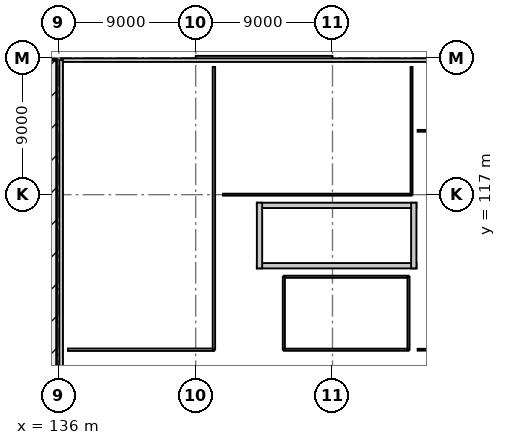
"""IFC4 building model, lengths in metres.
Left out: names, types, materials, properties, quantities, classifications, styles, units other than length and angle.
Written with IfcOpenShell. Run it as: python <this file> out.ifc"""

import sys

from ifc_helpers import new_model, si_unit, direction, frame, frame_2d, origin, origin_2d, place, context, subcontext, project, spatial, rectangle, i_section, extrude, element, fill, save


model = new_model("IFC4")
c1 = context("Model", 3, precision=1e-05, world=origin(), true_north=direction((0.0, 1.0)))
c2 = subcontext(c1, "Body", "Model", "MODEL_VIEW")
j1 = project(units=[si_unit("LENGTHUNIT", "METRE"), si_unit("PLANEANGLEUNIT", "RADIAN")], contexts=[c1])
p1 = place(None, origin())
s1 = spatial("IfcSite", under=j1, at=p1, CompositionType="ELEMENT")
p2 = place(p1, origin())
s2 = spatial("IfcBuilding", under=s1, at=p2, CompositionType="ELEMENT")
p3 = place(p2, frame((0.0, 0.0, 20.8)))
s3 = spatial("IfcBuildingStorey", under=s2, at=p3, CompositionType="ELEMENT", Elevation=20.8)
for number, where, z_axis, x_axis in (
    (1, (136.0, 117.0, 0.0), (0.0, 0.0, 1.0), (1.0, 0.0, 0.0)),
    (2, (136.0, 126.0, 0.0), (0.0, 0.0, 1.0), (1.0, 0.0, 0.0)),
    (3, (145.0, 117.0, 0.0), (0.0, 0.0, 1.0), (1.0, 0.0, 0.0)),
    (4, (145.0, 126.0, 0.0), (0.0, 0.0, 1.0), (1.0, 0.0, 0.0)),
    (5, (154.0, 117.0, 0.0), (0.0, 0.0, 1.0), (1.0, 0.0, 0.0)),
    (6, (154.0, 126.0, 0.0), (0.0, 0.0, 1.0), (1.0, 0.0, 0.0)),
):
    element("IfcColumn", number, at=place(p3, frame(where, z_axis=z_axis, x_axis=x_axis)), inside=s3, PredefinedType="COLUMN", context=c2, shape_type="SweptSolid", body=[
        extrude(i_section(OverallWidth=0.3, OverallDepth=0.3, WebThickness=0.01, FlangeThickness=0.015, FilletRadius=0.018, at=origin_2d()), origin(), (0.0, 0.0, 1.0), 2.85),
    ])
p4 = place(p3, frame((145.005, 126.0, 0.0), z_axis=(0.0, 0.0, 1.0), x_axis=(1.0, 0.0, 0.0)))
e7 = element("IfcWall", 7, at=p4, inside=s3, PredefinedType="SOLIDWALL", context=c2, shape_type="SweptSolid", body=[
    extrude(rectangle(XDim=8.99, YDim=0.26, at=frame_2d((4.495, 0.0))), origin(), (0.0, 0.0, 1.0), 2.23),
])
p5 = place(p4, frame((1.86, 0.0, 0.7)))
e8 = element("IfcOpeningElement", 8, at=p5, cuts=e7, PredefinedType="OPENING", context=c2, shape_type="SweptSolid", body=[
    extrude(rectangle(XDim=1.15, YDim=1.45, at=frame_2d((0.575, 0.725))), frame((0.0, 0.14, 0.0), z_axis=(0.0, -1.0, 0.0), x_axis=(1.0, 0.0, 0.0)), (0.0, 0.0, 1.0), 0.28),
])
p6 = place(p4, frame((5.98, 0.0, 0.7)))
e9 = element("IfcOpeningElement", 9, at=p6, cuts=e7, PredefinedType="OPENING", context=c2, shape_type="SweptSolid", body=[
    extrude(rectangle(XDim=1.15, YDim=1.45, at=frame_2d((0.575, 0.725))), frame((0.0, 0.14, 0.0), z_axis=(0.0, -1.0, 0.0), x_axis=(1.0, 0.0, 0.0)), (0.0, 0.0, 1.0), 0.28),
])
p7 = place(p3, frame((126.15, 125.85, 0.0), z_axis=(0.0, 0.0, 1.0), x_axis=(1.0, 0.0, 0.0)))
e10 = element("IfcWall", 10, at=p7, inside=s3, PredefinedType="PARAPET", context=c2, shape_type="SweptSolid", body=[
    extrude(rectangle(XDim=9.7, YDim=0.18, at=frame_2d((4.85, 0.0))), origin(), (0.0, 0.0, 1.0), 1.15),
])
p8 = place(p3, frame((187.85, 125.85, 2.85), z_axis=(0.0, 0.0, 1.0), x_axis=(-1.0, 0.0, 0.0)))
e11 = element("IfcWall", 11, at=p8, inside=s3, PredefinedType="PARAPET", context=c2, shape_type="SweptSolid", body=[
    extrude(rectangle(XDim=51.7, YDim=0.24, at=frame_2d((25.85, 0.0))), origin(), (0.0, 0.0, 1.0), 0.34),
])
p9 = place(p3, frame((136.15, 125.85, 2.85), z_axis=(0.0, 0.0, 1.0), x_axis=(0.0, -1.0, 0.0)))
e12 = element("IfcWall", 12, at=p9, inside=s3, PredefinedType="PARAPET", context=c2, shape_type="SweptSolid", body=[
    extrude(rectangle(XDim=22.2, YDim=0.24, at=frame_2d((11.1, 0.0))), origin(), (0.0, 0.0, 1.0), 0.34),
])
p10 = place(p3, frame((149.025, 112.325, 0.0), z_axis=(0.0, 0.0, 1.0), x_axis=(1.0, 0.0, 0.0)))
e13 = element("IfcWall", 13, at=p10, inside=s3, PredefinedType="SHEAR", context=c2, shape_type="SweptSolid", body=[
    extrude(rectangle(XDim=10.498, YDim=0.35, at=frame_2d((5.249, 0.0))), origin(), (0.0, 0.0, 1.0), 2.645),
])
p11 = place(p10, frame((0.55, 0.0, 0.0)))
e14 = element("IfcOpeningElement", 14, at=p11, cuts=e13, PredefinedType="OPENING", context=c2, shape_type="SweptSolid", body=[
    extrude(rectangle(XDim=1.3, YDim=2.1, at=frame_2d((0.65, 1.05))), frame((0.0, 0.185, 0.0), z_axis=(0.0, -1.0, 0.0), x_axis=(1.0, 0.0, 0.0)), (0.0, 0.0, 1.0), 0.37),
])
p12 = place(p3, frame((159.522, 116.295, 0.0), z_axis=(0.0, 0.0, 1.0), x_axis=(-1.0, 0.0, 0.0)))
e15 = element("IfcWall", 15, at=p12, inside=s3, PredefinedType="SHEAR", context=c2, shape_type="SweptSolid", body=[
    extrude(rectangle(XDim=10.498, YDim=0.35, at=frame_2d((5.249, 0.0))), origin(), (0.0, 0.0, 1.0), 2.645),
])
for number, where, z_axis, x_axis in (
    (16, (159.347, 112.15, 0.0), (0.0, 0.0, 1.0), (0.0, 1.0, 0.0)),
    (17, (149.2, 116.47, 0.0), (0.0, 0.0, 1.0), (0.0, -1.0, 0.0)),
):
    element("IfcWall", number, at=place(p3, frame(where, z_axis=z_axis, x_axis=x_axis)), inside=s3, PredefinedType="SHEAR", context=c2, shape_type="SweptSolid", body=[
        extrude(rectangle(XDim=4.32, YDim=0.35, at=frame_2d((2.16, 0.0))), origin(), (0.0, 0.0, 1.0), 2.645),
    ])
p13 = place(p3, frame((146.2, 106.8, 0.0), z_axis=(0.0, 0.0, 1.0), x_axis=(-1.0, 0.0, 0.0)))
e18 = element("IfcWall", 18, at=p13, inside=s3, PredefinedType="PARTITIONING", context=c2, shape_type="SweptSolid", body=[
    extrude(rectangle(XDim=9.6, YDim=0.16, at=frame_2d((4.8, 0.0))), origin(), (0.0, 0.0, 1.0), 2.18),
])
p14 = place(p13, frame((4.025, 0.0, 0.0)))
e19 = element("IfcOpeningElement", 19, at=p14, cuts=e18, PredefinedType="OPENING", context=c2, shape_type="SweptSolid", body=[
    extrude(rectangle(XDim=1.55, YDim=2.1, at=frame_2d((0.775, 1.05))), frame((0.0, 0.09, 0.0), z_axis=(0.0, -1.0, 0.0), x_axis=(1.0, 0.0, 0.0)), (0.0, 0.0, 1.0), 0.18),
])
p15 = place(p3, frame((146.2, 125.4, 0.0), z_axis=(0.0, 0.0, 1.0), x_axis=(0.0, -1.0, 0.0)))
e20 = element("IfcWall", 20, at=p15, inside=s3, PredefinedType="PARTITIONING", context=c2, shape_type="SweptSolid", body=[
    extrude(rectangle(XDim=18.6, YDim=0.16, at=frame_2d((9.3, 0.0))), origin(), (0.0, 0.0, 1.0), 2.23),
])
p16 = place(p3, frame((159.0, 106.8, 0.0), z_axis=(0.0, 0.0, 1.0), x_axis=(-1.0, 0.0, 0.0)))
e21 = element("IfcWall", 21, at=p16, inside=s3, PredefinedType="PARTITIONING", context=c2, shape_type="SweptSolid", body=[
    extrude(rectangle(XDim=8.2, YDim=0.14, at=frame_2d((4.1, 0.0))), origin(), (0.0, 0.0, 1.0), 2.18),
])
p17 = place(p16, frame((3.475, 0.0, 0.0)))
e22 = element("IfcOpeningElement", 22, at=p17, cuts=e21, PredefinedType="OPENING", context=c2, shape_type="SweptSolid", body=[
    extrude(rectangle(XDim=1.25, YDim=2.1, at=frame_2d((0.625, 1.05))), frame((0.0, 0.08, 0.0), z_axis=(0.0, -1.0, 0.0), x_axis=(1.0, 0.0, 0.0)), (0.0, 0.0, 1.0), 0.16),
])
p18 = place(p3, frame((150.8, 111.6, 0.0), z_axis=(0.0, 0.0, 1.0), x_axis=(1.0, 0.0, 0.0)))
e23 = element("IfcWall", 23, at=p18, inside=s3, PredefinedType="PARTITIONING", context=c2, shape_type="SweptSolid", body=[
    extrude(rectangle(XDim=8.2, YDim=0.14, at=frame_2d((4.1, 0.0))), origin(), (0.0, 0.0, 1.0), 2.18),
])
p19 = place(p3, frame((150.8, 106.8, 0.0), z_axis=(0.0, 0.0, 1.0), x_axis=(0.0, 1.0, 0.0)))
e24 = element("IfcWall", 24, at=p19, inside=s3, PredefinedType="PARTITIONING", context=c2, shape_type="SweptSolid", body=[
    extrude(rectangle(XDim=4.8, YDim=0.14, at=frame_2d((2.4, 0.0))), origin(), (0.0, 0.0, 1.0), 2.62),
])
p20 = place(p3, frame((159.0, 111.6, 0.0), z_axis=(0.0, 0.0, 1.0), x_axis=(0.0, -1.0, 0.0)))
e25 = element("IfcWall", 25, at=p20, inside=s3, PredefinedType="PARTITIONING", context=c2, shape_type="SweptSolid", body=[
    extrude(rectangle(XDim=4.8, YDim=0.14, at=frame_2d((2.4, 0.0))), origin(), (0.0, 0.0, 1.0), 2.22),
])
p21 = place(p3, frame((159.2, 117.0, 0.0), z_axis=(0.0, 0.0, 1.0), x_axis=(-1.0, 0.0, 0.0)))
e26 = element("IfcWall", 26, at=p21, inside=s3, PredefinedType="PARTITIONING", context=c2, shape_type="SweptSolid", body=[
    extrude(rectangle(XDim=12.4, YDim=0.13, at=frame_2d((6.2, 0.0))), origin(), (0.0, 0.0, 1.0), 2.18),
])
p22 = place(p3, frame((159.2, 125.4, 0.0), z_axis=(0.0, 0.0, 1.0), x_axis=(0.0, -1.0, 0.0)))
e27 = element("IfcWall", 27, at=p22, inside=s3, PredefinedType="PARTITIONING", context=c2, shape_type="SweptSolid", body=[
    extrude(rectangle(XDim=8.4, YDim=0.13, at=frame_2d((4.2, 0.0))), origin(), (0.0, 0.0, 1.0), 2.22),
])
p23 = place(p22, frame((3.575, 0.0, 0.0)))
e28 = element("IfcOpeningElement", 28, at=p23, cuts=e27, PredefinedType="OPENING", context=c2, shape_type="SweptSolid", body=[
    extrude(rectangle(XDim=1.25, YDim=2.1, at=frame_2d((0.625, 1.05))), frame((0.0, 0.075, 0.0), z_axis=(0.0, -1.0, 0.0), x_axis=(1.0, 0.0, 0.0)), (0.0, 0.0, 1.0), 0.15),
])
p24 = place(p3, frame((163.2, 106.8, 0.0), z_axis=(0.0, 0.0, 1.0), x_axis=(-1.0, 0.0, 0.0)))
e29 = element("IfcWall", 29, at=p24, inside=s3, PredefinedType="PARTITIONING", context=c2, shape_type="SweptSolid", body=[
    extrude(rectangle(XDim=3.6, YDim=0.12, at=frame_2d((1.8, 0.0))), origin(), (0.0, 0.0, 1.0), 2.18),
])
p25 = place(p24, frame((1.275, 0.0, 0.0)))
e30 = element("IfcOpeningElement", 30, at=p25, cuts=e29, PredefinedType="OPENING", context=c2, shape_type="SweptSolid", body=[
    extrude(rectangle(XDim=1.05, YDim=2.1, at=frame_2d((0.525, 1.05))), frame((0.0, 0.07, 0.0), z_axis=(0.0, -1.0, 0.0), x_axis=(1.0, 0.0, 0.0)), (0.0, 0.0, 1.0), 0.14),
])
p26 = place(p3, frame((159.6, 121.2, 0.0), z_axis=(0.0, 0.0, 1.0), x_axis=(1.0, 0.0, 0.0)))
e31 = element("IfcWall", 31, at=p26, inside=s3, PredefinedType="PARTITIONING", context=c2, shape_type="SweptSolid", body=[
    extrude(rectangle(XDim=3.6, YDim=0.12, at=frame_2d((1.8, 0.0))), origin(), (0.0, 0.0, 1.0), 2.23),
])
p27 = place(p5, origin())
e32 = element("IfcWindow", 32, at=p27, inside=s3, PartitioningType="SINGLE_PANEL", PredefinedType="WINDOW", context=c2, shape_type="SweptSolid", body=[
    extrude(rectangle(XDim=1.15, YDim=1.45, at=frame_2d((0.575, 0.725))), frame((0.0, 0.03, 0.0), z_axis=(0.0, -1.0, 0.0), x_axis=(1.0, 0.0, 0.0)), (0.0, 0.0, 1.0), 0.06),
])
fill(e8, e32)
p28 = place(p6, origin())
e33 = element("IfcWindow", 33, at=p28, inside=s3, PartitioningType="SINGLE_PANEL", PredefinedType="WINDOW", context=c2, shape_type="SweptSolid", body=[
    extrude(rectangle(XDim=1.15, YDim=1.45, at=frame_2d((0.575, 0.725))), frame((0.0, 0.03, 0.0), z_axis=(0.0, -1.0, 0.0), x_axis=(1.0, 0.0, 0.0)), (0.0, 0.0, 1.0), 0.06),
])
fill(e9, e33)
p29 = place(p11, origin())
e34 = element("IfcDoor", 34, at=p29, inside=s3, OperationType="SINGLE_SWING_LEFT", PredefinedType="DOOR", context=c2, shape_type="SweptSolid", body=[
    extrude(rectangle(XDim=1.3, YDim=2.1, at=frame_2d((0.65, 1.05))), frame((0.0, 0.025, 0.0), z_axis=(0.0, -1.0, 0.0), x_axis=(1.0, 0.0, 0.0)), (0.0, 0.0, 1.0), 0.05),
])
fill(e14, e34)
p30 = place(p14, origin())
e35 = element("IfcDoor", 35, at=p30, inside=s3, OperationType="SINGLE_SWING_RIGHT", PredefinedType="DOOR", context=c2, shape_type="SweptSolid", body=[
    extrude(rectangle(XDim=1.55, YDim=2.1, at=frame_2d((0.775, 1.05))), frame((0.0, 0.025, 0.0), z_axis=(0.0, -1.0, 0.0), x_axis=(1.0, 0.0, 0.0)), (0.0, 0.0, 1.0), 0.05),
])
fill(e19, e35)
p31 = place(p17, origin())
e36 = element("IfcDoor", 36, at=p31, inside=s3, OperationType="SINGLE_SWING_LEFT", PredefinedType="DOOR", context=c2, shape_type="SweptSolid", body=[
    extrude(rectangle(XDim=1.25, YDim=2.1, at=frame_2d((0.625, 1.05))), frame((0.0, 0.025, 0.0), z_axis=(0.0, -1.0, 0.0), x_axis=(1.0, 0.0, 0.0)), (0.0, 0.0, 1.0), 0.05),
])
fill(e22, e36)
p32 = place(p23, origin())
e37 = element("IfcDoor", 37, at=p32, inside=s3, OperationType="SINGLE_SWING_RIGHT", PredefinedType="DOOR", context=c2, shape_type="SweptSolid", body=[
    extrude(rectangle(XDim=1.25, YDim=2.1, at=frame_2d((0.625, 1.05))), frame((0.0, 0.025, 0.0), z_axis=(0.0, -1.0, 0.0), x_axis=(1.0, 0.0, 0.0)), (0.0, 0.0, 1.0), 0.05),
])
fill(e28, e37)
save(model, sys.argv[1])
